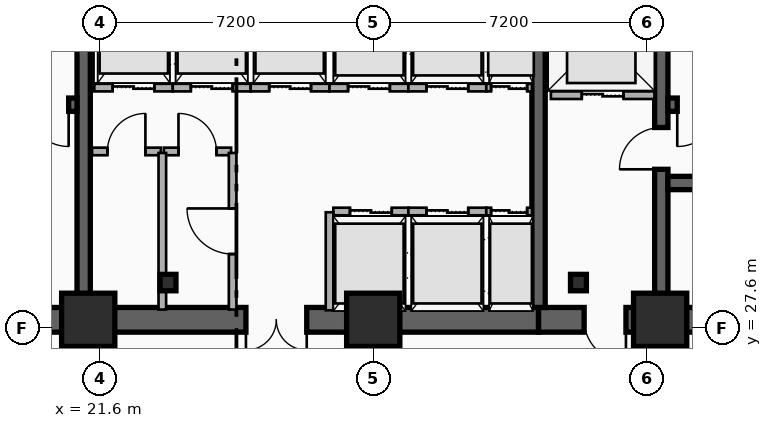
"""IFC4 building model, lengths in metres.
Left out: names, types, materials, properties, quantities, classifications, styles, units other than length and angle.
Written with IfcOpenShell. Run it as: python <this file> out.ifc"""

import sys

from ifc_helpers import new_model, si_unit, direction, frame, frame_2d, origin, origin_2d, place, context, subcontext, project, spatial, rectangle, i_section, extrude, element, fill, save


model = new_model("IFC4")
c1 = context("Model", 3, precision=1e-05, world=origin(), true_north=direction((0.0, 1.0)))
c2 = subcontext(c1, "Body", "Model", "MODEL_VIEW")
j1 = project(units=[si_unit("LENGTHUNIT", "METRE"), si_unit("PLANEANGLEUNIT", "RADIAN")], contexts=[c1])
p1 = place(None, origin())
s1 = spatial("IfcSite", under=j1, at=p1, CompositionType="ELEMENT")
p2 = place(p1, origin())
s2 = spatial("IfcBuilding", under=s1, at=p2, CompositionType="ELEMENT")
p3 = place(p2, frame((0.0, 0.0, 89.8)))
s3 = spatial("IfcBuildingStorey", under=s2, at=p3, CompositionType="ELEMENT", Elevation=89.8)
p4 = place(p3, frame((21.18, 27.82, 0.0), z_axis=(0.0, 0.0, 1.0), x_axis=(-1.0, 0.0, 0.0)))
e1 = element("IfcWall", 1, at=p4, inside=s3, PredefinedType="SHEAR", context=c2, shape_type="SweptSolid", body=[
    extrude(rectangle(XDim=9.03, YDim=0.65, at=frame_2d((4.515, 0.0))), origin(), (0.0, 0.0, 1.0), 4.5),
])
p5 = place(p4, frame((2.68, 0.0, 0.0)))
e2 = element("IfcOpeningElement", 2, at=p5, cuts=e1, PredefinedType="OPENING", context=c2, shape_type="SweptSolid", body=[
    extrude(rectangle(XDim=1.1, YDim=2.15, at=frame_2d((0.55, 1.075))), frame((0.0, 0.335, 0.0), z_axis=(0.0, -1.0, 0.0), x_axis=(1.0, 0.0, 0.0)), (0.0, 0.0, 1.0), 0.67),
])
p6 = place(p3, frame((33.15, 27.82, 0.0), z_axis=(0.0, 0.0, 1.0), x_axis=(-1.0, 0.0, 0.0)))
e3 = element("IfcWall", 3, at=p6, inside=s3, PredefinedType="SHEAR", context=c2, shape_type="SweptSolid", body=[
    extrude(rectangle(XDim=11.97, YDim=0.65, at=frame_2d((5.985, 0.0))), origin(), (0.0, 0.0, 1.0), 4.5),
])
p7 = place(p6, frame((6.1, 0.0, 0.0)))
e4 = element("IfcOpeningElement", 4, at=p7, cuts=e3, PredefinedType="OPENING", context=c2, shape_type="SweptSolid", body=[
    extrude(rectangle(XDim=1.6, YDim=2.2, at=frame_2d((0.8, 1.1))), frame((0.0, 0.335, 0.0), z_axis=(0.0, -1.0, 0.0), x_axis=(1.0, 0.0, 0.0)), (0.0, 0.0, 1.0), 0.67),
])
p8 = place(p3, frame((45.38, 27.82, 0.0), z_axis=(0.0, 0.0, 1.0), x_axis=(-1.0, 0.0, 0.0)))
e5 = element("IfcWall", 5, at=p8, inside=s3, PredefinedType="SHEAR", context=c2, shape_type="SweptSolid", body=[
    extrude(rectangle(XDim=12.23, YDim=0.65, at=frame_2d((6.115, 0.0))), origin(), (0.0, 0.0, 1.0), 4.5),
])
p9 = place(p8, frame((9.93, 0.0, 0.0)))
e6 = element("IfcOpeningElement", 6, at=p9, cuts=e5, PredefinedType="OPENING", context=c2, shape_type="SweptSolid", body=[
    extrude(rectangle(XDim=1.1, YDim=2.15, at=frame_2d((0.55, 1.075))), frame((0.0, 0.335, 0.0), z_axis=(0.0, -1.0, 0.0), x_axis=(1.0, 0.0, 0.0)), (0.0, 0.0, 1.0), 0.67),
])
p10 = place(p8, frame((6.23, 0.0, 0.0)))
e7 = element("IfcOpeningElement", 7, at=p10, cuts=e5, PredefinedType="OPENING", context=c2, shape_type="SweptSolid", body=[
    extrude(rectangle(XDim=1.1, YDim=2.15, at=frame_2d((0.55, 1.075))), frame((0.0, 0.335, 0.0), z_axis=(0.0, -1.0, 0.0), x_axis=(1.0, 0.0, 0.0)), (0.0, 0.0, 1.0), 0.67),
])
for number, where, z_axis, x_axis in (
    (8, (21.18, 28.145, 0.0), (0.0, 0.0, 1.0), (0.0, 1.0, 0.0)),
    (9, (33.15, 28.145, 0.0), (0.0, 0.0, 1.0), (0.0, 1.0, 0.0)),
):
    element("IfcWall", number, at=place(p3, frame(where, z_axis=z_axis, x_axis=x_axis)), inside=s3, PredefinedType="SHEAR", context=c2, shape_type="SweptSolid", body=[
        extrude(rectangle(XDim=8.58, YDim=0.35, at=frame_2d((4.29, 0.0))), origin(), (0.0, 0.0, 1.0), 4.5),
    ])
p11 = place(p3, frame((36.38, 28.145, 0.0), z_axis=(0.0, 0.0, 1.0), x_axis=(0.0, 1.0, 0.0)))
e10 = element("IfcWall", 10, at=p11, inside=s3, PredefinedType="SHEAR", context=c2, shape_type="SweptSolid", body=[
    extrude(rectangle(XDim=8.58, YDim=0.35, at=frame_2d((4.29, 0.0))), origin(), (0.0, 0.0, 1.0), 4.5),
])
p12 = place(p11, frame((3.635, 0.0, 0.0)))
e11 = element("IfcOpeningElement", 11, at=p12, cuts=e10, PredefinedType="OPENING", context=c2, shape_type="SweptSolid", body=[
    extrude(rectangle(XDim=1.1, YDim=2.15, at=frame_2d((0.55, 1.075))), frame((0.0, 0.185, 0.0), z_axis=(0.0, -1.0, 0.0), x_axis=(1.0, 0.0, 0.0)), (0.0, 0.0, 1.0), 0.37),
])
p13 = place(p3, frame((21.005, 33.48, 0.0), z_axis=(0.0, 0.0, 1.0), x_axis=(-1.0, 0.0, 0.0)))
e12 = element("IfcWall", 12, at=p13, inside=s3, PredefinedType="SHEAR", context=c2, shape_type="SweptSolid", body=[
    extrude(rectangle(XDim=8.53, YDim=0.35, at=frame_2d((4.265, 0.0))), origin(), (0.0, 0.0, 1.0), 4.5),
])
p14 = place(p13, frame((0.22, 0.0, 0.0)))
e13 = element("IfcOpeningElement", 13, at=p14, cuts=e12, PredefinedType="OPENING", context=c2, shape_type="SweptSolid", body=[
    extrude(rectangle(XDim=1.1, YDim=2.15, at=frame_2d((0.55, 1.075))), frame((0.0, 0.185, 0.0), z_axis=(0.0, -1.0, 0.0), x_axis=(1.0, 0.0, 0.0)), (0.0, 0.0, 1.0), 0.37),
])
p15 = place(p3, frame((45.055, 33.48, 0.0), z_axis=(0.0, 0.0, 1.0), x_axis=(-1.0, 0.0, 0.0)))
e14 = element("IfcWall", 14, at=p15, inside=s3, PredefinedType="SHEAR", context=c2, shape_type="SweptSolid", body=[
    extrude(rectangle(XDim=8.5, YDim=0.35, at=frame_2d((4.25, 0.0))), origin(), (0.0, 0.0, 1.0), 4.5),
])
p16 = place(p15, frame((7.155, 0.0, 0.0)))
e15 = element("IfcOpeningElement", 15, at=p16, cuts=e14, PredefinedType="OPENING", context=c2, shape_type="SweptSolid", body=[
    extrude(rectangle(XDim=1.1, YDim=2.15, at=frame_2d((0.55, 1.075))), frame((0.0, 0.185, 0.0), z_axis=(0.0, -1.0, 0.0), x_axis=(1.0, 0.0, 0.0)), (0.0, 0.0, 1.0), 0.37),
])
p17 = place(p3, frame((36.555, 31.42, 0.0), z_axis=(0.0, 0.0, 1.0), x_axis=(1.0, 0.0, 0.0)))
e16 = element("IfcWall", 16, at=p17, inside=s3, PredefinedType="SHEAR", context=c2, shape_type="SweptSolid", body=[
    extrude(rectangle(XDim=8.5, YDim=0.35, at=frame_2d((4.25, 0.0))), origin(), (0.0, 0.0, 1.0), 4.5),
])
for number, where, z_axis, x_axis in (
    (17, (23.4, 28.8, 0.0), (0.0, 0.0, 1.0), (1.0, 0.0, 0.0)),
    (18, (34.2, 28.8, 0.0), (0.0, 0.0, 1.0), (1.0, 0.0, 0.0)),
):
    element("IfcColumn", number, at=place(p3, frame(where, z_axis=z_axis, x_axis=x_axis)), inside=s3, PredefinedType="COLUMN", context=c2, shape_type="SweptSolid", body=[
        extrude(i_section(OverallWidth=0.418, OverallDepth=0.432, WebThickness=0.035, FlangeThickness=0.056, FilletRadius=0.015, at=origin_2d()), origin(), (0.0, 0.0, 1.0), 4.5),
    ])
for number, where, z_axis, x_axis in (
    (19, (21.3, 27.82, 0.0), (0.0, 0.0, 1.0), (1.0, 0.0, 0.0)),
    (20, (28.8, 27.82, 0.0), (0.0, 0.0, 1.0), (1.0, 0.0, 0.0)),
    (21, (36.35, 27.82, 0.0), (0.0, 0.0, 1.0), (1.0, 0.0, 0.0)),
):
    element("IfcColumn", number, at=place(p3, frame(where, z_axis=z_axis, x_axis=x_axis)), inside=s3, PredefinedType="COLUMN", context=c2, shape_type="SweptSolid", body=[
        extrude(rectangle(XDim=1.4, YDim=1.4, at=origin_2d()), origin(), (0.0, 0.0, 1.0), 4.5),
    ])
p18 = place(p3, frame((33.475, 33.73, 0.0), z_axis=(0.0, 0.0, 1.0), x_axis=(1.0, 0.0, 0.0)))
e22 = element("IfcWall", 22, at=p18, inside=s3, PredefinedType="PARTITIONING", context=c2, shape_type="SweptSolid", body=[
    extrude(rectangle(XDim=2.725, YDim=0.2, at=frame_2d((1.362, 0.0))), origin(), (0.0, 0.0, 1.0), 3.212),
])
p19 = place(p18, frame((0.812, 0.0, 0.0)))
e23 = element("IfcOpeningElement", 23, at=p19, cuts=e22, PredefinedType="OPENING", context=c2, shape_type="SweptSolid", body=[
    extrude(rectangle(XDim=1.1, YDim=2.15, at=frame_2d((0.55, 1.075))), frame((0.0, 0.11, 0.0), z_axis=(0.0, -1.0, 0.0), x_axis=(1.0, 0.0, 0.0)), (0.0, 0.0, 1.0), 0.22),
])
p20 = place(p3, frame((27.75, 30.67, 0.0), z_axis=(0.0, 0.0, 1.0), x_axis=(1.0, 0.0, 0.0)))
e24 = element("IfcWall", 24, at=p20, inside=s3, PredefinedType="PARTITIONING", context=c2, shape_type="SweptSolid", body=[
    extrude(rectangle(XDim=1.975, YDim=0.2, at=frame_2d((0.988, 0.0))), origin(), (0.0, 0.0, 1.0), 3.212),
])
p21 = place(p20, frame((0.438, 0.0, 0.0)))
e25 = element("IfcOpeningElement", 25, at=p21, cuts=e24, PredefinedType="OPENING", context=c2, shape_type="SweptSolid", body=[
    extrude(rectangle(XDim=1.1, YDim=2.15, at=frame_2d((0.55, 1.075))), frame((0.0, 0.11, 0.0), z_axis=(0.0, -1.0, 0.0), x_axis=(1.0, 0.0, 0.0)), (0.0, 0.0, 1.0), 0.22),
])
p22 = place(p3, frame((27.65, 28.07, 0.0), z_axis=(0.0, 0.0, 1.0), x_axis=(0.0, 1.0, 0.0)))
e26 = element("IfcWall", 26, at=p22, inside=s3, PredefinedType="PARTITIONING", context=c2, shape_type="SweptSolid", body=[
    extrude(rectangle(XDim=2.58, YDim=0.2, at=frame_2d((1.29, 0.0))), origin(), (0.0, 0.0, 1.0), 3.212),
])
p23 = place(p3, frame((29.725, 30.67, 0.0), z_axis=(0.0, 0.0, 1.0), x_axis=(1.0, 0.0, 0.0)))
e27 = element("IfcWall", 27, at=p23, inside=s3, PredefinedType="PARTITIONING", context=c2, shape_type="SweptSolid", body=[
    extrude(rectangle(XDim=2.05, YDim=0.2, at=frame_2d((1.025, 0.0))), origin(), (0.0, 0.0, 1.0), 3.62),
])
p24 = place(p23, frame((0.475, 0.0, 0.0)))
e28 = element("IfcOpeningElement", 28, at=p24, cuts=e27, PredefinedType="OPENING", context=c2, shape_type="SweptSolid", body=[
    extrude(rectangle(XDim=1.1, YDim=2.15, at=frame_2d((0.55, 1.075))), frame((0.0, 0.11, 0.0), z_axis=(0.0, -1.0, 0.0), x_axis=(1.0, 0.0, 0.0)), (0.0, 0.0, 1.0), 0.22),
])
p25 = place(p3, frame((31.775, 30.67, 0.0), z_axis=(0.0, 0.0, 1.0), x_axis=(1.0, 0.0, 0.0)))
e29 = element("IfcWall", 29, at=p25, inside=s3, PredefinedType="PARTITIONING", context=c2, shape_type="SweptSolid", body=[
    extrude(rectangle(XDim=1.2, YDim=0.2, at=frame_2d((0.6, 0.0))), origin(), (0.0, 0.0, 1.0), 3.62),
])
p26 = place(p25, frame((0.125, 0.0, 0.0)))
e30 = element("IfcOpeningElement", 30, at=p26, cuts=e29, PredefinedType="OPENING", context=c2, shape_type="SweptSolid", body=[
    extrude(rectangle(XDim=0.95, YDim=2.15, at=frame_2d((0.475, 1.075))), frame((0.0, 0.11, 0.0), z_axis=(0.0, -1.0, 0.0), x_axis=(1.0, 0.0, 0.0)), (0.0, 0.0, 1.0), 0.22),
])
p27 = place(p3, frame((21.46, 33.93, 0.0), z_axis=(0.0, 0.0, 1.0), x_axis=(1.0, 0.0, 0.0)))
e31 = element("IfcWall", 31, at=p27, inside=s3, PredefinedType="PARTITIONING", context=c2, shape_type="SweptSolid", body=[
    extrude(rectangle(XDim=2.065, YDim=0.2, at=frame_2d((1.032, 0.0))), origin(), (0.0, 0.0, 1.0), 3.212),
])
p28 = place(p27, frame((0.482, 0.0, 0.0)))
e32 = element("IfcOpeningElement", 32, at=p28, cuts=e31, PredefinedType="OPENING", context=c2, shape_type="SweptSolid", body=[
    extrude(rectangle(XDim=1.1, YDim=2.15, at=frame_2d((0.55, 1.075))), frame((0.0, 0.11, 0.0), z_axis=(0.0, -1.0, 0.0), x_axis=(1.0, 0.0, 0.0)), (0.0, 0.0, 1.0), 0.22),
])
p29 = place(p3, frame((23.525, 33.93, 0.0), z_axis=(0.0, 0.0, 1.0), x_axis=(1.0, 0.0, 0.0)))
e33 = element("IfcWall", 33, at=p29, inside=s3, PredefinedType="PARTITIONING", context=c2, shape_type="SweptSolid", body=[
    extrude(rectangle(XDim=2.05, YDim=0.2, at=frame_2d((1.025, 0.0))), origin(), (0.0, 0.0, 1.0), 4.24),
])
p30 = place(p29, frame((0.475, 0.0, 0.0)))
e34 = element("IfcOpeningElement", 34, at=p30, cuts=e33, PredefinedType="OPENING", context=c2, shape_type="SweptSolid", body=[
    extrude(rectangle(XDim=1.1, YDim=2.15, at=frame_2d((0.55, 1.075))), frame((0.0, 0.11, 0.0), z_axis=(0.0, -1.0, 0.0), x_axis=(1.0, 0.0, 0.0)), (0.0, 0.0, 1.0), 0.22),
])
p31 = place(p3, frame((25.575, 33.93, 0.0), z_axis=(0.0, 0.0, 1.0), x_axis=(1.0, 0.0, 0.0)))
e35 = element("IfcWall", 35, at=p31, inside=s3, PredefinedType="PARTITIONING", context=c2, shape_type="SweptSolid", body=[
    extrude(rectangle(XDim=2.075, YDim=0.2, at=frame_2d((1.038, 0.0))), origin(), (0.0, 0.0, 1.0), 4.24),
])
p32 = place(p31, frame((0.488, 0.0, 0.0)))
e36 = element("IfcOpeningElement", 36, at=p32, cuts=e35, PredefinedType="OPENING", context=c2, shape_type="SweptSolid", body=[
    extrude(rectangle(XDim=1.1, YDim=2.15, at=frame_2d((0.55, 1.075))), frame((0.0, 0.11, 0.0), z_axis=(0.0, -1.0, 0.0), x_axis=(1.0, 0.0, 0.0)), (0.0, 0.0, 1.0), 0.22),
])
p33 = place(p3, frame((27.65, 33.93, 0.0), z_axis=(0.0, 0.0, 1.0), x_axis=(1.0, 0.0, 0.0)))
e37 = element("IfcWall", 37, at=p33, inside=s3, PredefinedType="PARTITIONING", context=c2, shape_type="SweptSolid", body=[
    extrude(rectangle(XDim=2.075, YDim=0.2, at=frame_2d((1.038, 0.0))), origin(), (0.0, 0.0, 1.0), 3.212),
])
p34 = place(p33, frame((0.488, 0.0, 0.0)))
e38 = element("IfcOpeningElement", 38, at=p34, cuts=e37, PredefinedType="OPENING", context=c2, shape_type="SweptSolid", body=[
    extrude(rectangle(XDim=1.1, YDim=2.15, at=frame_2d((0.55, 1.075))), frame((0.0, 0.11, 0.0), z_axis=(0.0, -1.0, 0.0), x_axis=(1.0, 0.0, 0.0)), (0.0, 0.0, 1.0), 0.22),
])
p35 = place(p3, frame((29.725, 33.93, 0.0), z_axis=(0.0, 0.0, 1.0), x_axis=(1.0, 0.0, 0.0)))
e39 = element("IfcWall", 39, at=p35, inside=s3, PredefinedType="PARTITIONING", context=c2, shape_type="SweptSolid", body=[
    extrude(rectangle(XDim=2.05, YDim=0.2, at=frame_2d((1.025, 0.0))), origin(), (0.0, 0.0, 1.0), 4.24),
])
p36 = place(p35, frame((0.475, 0.0, 0.0)))
e40 = element("IfcOpeningElement", 40, at=p36, cuts=e39, PredefinedType="OPENING", context=c2, shape_type="SweptSolid", body=[
    extrude(rectangle(XDim=1.1, YDim=2.15, at=frame_2d((0.55, 1.075))), frame((0.0, 0.11, 0.0), z_axis=(0.0, -1.0, 0.0), x_axis=(1.0, 0.0, 0.0)), (0.0, 0.0, 1.0), 0.22),
])
p37 = place(p3, frame((31.775, 33.93, 0.0), z_axis=(0.0, 0.0, 1.0), x_axis=(1.0, 0.0, 0.0)))
e41 = element("IfcWall", 41, at=p37, inside=s3, PredefinedType="PARTITIONING", context=c2, shape_type="SweptSolid", body=[
    extrude(rectangle(XDim=1.2, YDim=0.2, at=frame_2d((0.6, 0.0))), origin(), (0.0, 0.0, 1.0), 4.24),
])
p38 = place(p37, frame((0.125, 0.0, 0.0)))
e42 = element("IfcOpeningElement", 42, at=p38, cuts=e41, PredefinedType="OPENING", context=c2, shape_type="SweptSolid", body=[
    extrude(rectangle(XDim=0.95, YDim=2.15, at=frame_2d((0.475, 1.075))), frame((0.0, 0.11, 0.0), z_axis=(0.0, -1.0, 0.0), x_axis=(1.0, 0.0, 0.0)), (0.0, 0.0, 1.0), 0.22),
])
p39 = place(p3, frame((21.4, 32.25, 0.0), z_axis=(0.0, 0.0, 1.0), x_axis=(1.0, 0.0, 0.0)))
e43 = element("IfcWall", 43, at=p39, inside=s3, PredefinedType="PARTITIONING", context=c2, shape_type="SweptSolid", body=[
    extrude(rectangle(XDim=1.81, YDim=0.2, at=frame_2d((0.905, 0.0))), origin(), (0.0, 0.0, 1.0), 3.212),
])
p40 = place(p39, frame((0.405, 0.0, 0.0)))
e44 = element("IfcOpeningElement", 44, at=p40, cuts=e43, PredefinedType="OPENING", context=c2, shape_type="SweptSolid", body=[
    extrude(rectangle(XDim=1.0, YDim=2.15, at=frame_2d((0.5, 1.075))), frame((0.0, 0.11, 0.0), z_axis=(0.0, -1.0, 0.0), x_axis=(1.0, 0.0, 0.0)), (0.0, 0.0, 1.0), 0.22),
])
p41 = place(p3, frame((23.29, 32.25, 0.0), z_axis=(0.0, 0.0, 1.0), x_axis=(1.0, 0.0, 0.0)))
e45 = element("IfcWall", 45, at=p41, inside=s3, PredefinedType="PARTITIONING", context=c2, shape_type="SweptSolid", body=[
    extrude(rectangle(XDim=1.77, YDim=0.2, at=frame_2d((0.885, 0.0))), origin(), (0.0, 0.0, 1.0), 4.24),
])
p42 = place(p41, frame((0.385, 0.0, 0.0)))
e46 = element("IfcOpeningElement", 46, at=p42, cuts=e45, PredefinedType="OPENING", context=c2, shape_type="SweptSolid", body=[
    extrude(rectangle(XDim=1.0, YDim=2.15, at=frame_2d((0.5, 1.075))), frame((0.0, 0.11, 0.0), z_axis=(0.0, -1.0, 0.0), x_axis=(1.0, 0.0, 0.0)), (0.0, 0.0, 1.0), 0.22),
])
p43 = place(p3, frame((25.1, 28.09, 0.0), z_axis=(0.0, 0.0, 1.0), x_axis=(0.0, 1.0, 0.0)))
e47 = element("IfcWall", 47, at=p43, inside=s3, PredefinedType="PARTITIONING", context=c2, shape_type="SweptSolid", body=[
    extrude(rectangle(XDim=4.12, YDim=0.2, at=frame_2d((2.06, 0.0))), origin(), (0.0, 0.0, 1.0), 3.62),
])
p44 = place(p43, frame((1.46, 0.0, 0.0)))
e48 = element("IfcOpeningElement", 48, at=p44, cuts=e47, PredefinedType="OPENING", context=c2, shape_type="SweptSolid", body=[
    extrude(rectangle(XDim=1.2, YDim=2.15, at=frame_2d((0.6, 1.075))), frame((0.0, 0.11, 0.0), z_axis=(0.0, -1.0, 0.0), x_axis=(1.0, 0.0, 0.0)), (0.0, 0.0, 1.0), 0.22),
])
p45 = place(p3, frame((23.25, 28.09, 0.0), z_axis=(0.0, 0.0, 1.0), x_axis=(0.0, 1.0, 0.0)))
e49 = element("IfcWall", 49, at=p45, inside=s3, PredefinedType="PARTITIONING", context=c2, shape_type="SweptSolid", body=[
    extrude(rectangle(XDim=4.12, YDim=0.2, at=frame_2d((2.06, 0.0))), origin(), (0.0, 0.0, 1.0), 3.62),
])
p46 = place(p19, origin())
e50 = element("IfcDoor", 50, at=p46, inside=s3, OperationType="DOUBLE_DOOR_SLIDING", PredefinedType="DOOR", context=c2, shape_type="SweptSolid", body=[
    extrude(rectangle(XDim=1.1, YDim=2.15, at=frame_2d((0.55, 1.075))), frame((0.0, 0.025, 0.0), z_axis=(0.0, -1.0, 0.0), x_axis=(1.0, 0.0, 0.0)), (0.0, 0.0, 1.0), 0.05),
])
fill(e23, e50)
p47 = place(p21, origin())
e51 = element("IfcDoor", 51, at=p47, inside=s3, OperationType="DOUBLE_DOOR_SLIDING", PredefinedType="DOOR", context=c2, shape_type="SweptSolid", body=[
    extrude(rectangle(XDim=1.1, YDim=2.15, at=frame_2d((0.55, 1.075))), frame((0.0, 0.025, 0.0), z_axis=(0.0, -1.0, 0.0), x_axis=(1.0, 0.0, 0.0)), (0.0, 0.0, 1.0), 0.05),
])
fill(e25, e51)
p48 = place(p24, origin())
e52 = element("IfcDoor", 52, at=p48, inside=s3, OperationType="DOUBLE_DOOR_SLIDING", PredefinedType="DOOR", context=c2, shape_type="SweptSolid", body=[
    extrude(rectangle(XDim=1.1, YDim=2.15, at=frame_2d((0.55, 1.075))), frame((0.0, 0.025, 0.0), z_axis=(0.0, -1.0, 0.0), x_axis=(1.0, 0.0, 0.0)), (0.0, 0.0, 1.0), 0.05),
])
fill(e28, e52)
p49 = place(p26, origin())
e53 = element("IfcDoor", 53, at=p49, inside=s3, OperationType="DOUBLE_DOOR_SLIDING", PredefinedType="DOOR", context=c2, shape_type="SweptSolid", body=[
    extrude(rectangle(XDim=0.95, YDim=2.15, at=frame_2d((0.475, 1.075))), frame((0.0, 0.025, 0.0), z_axis=(0.0, -1.0, 0.0), x_axis=(1.0, 0.0, 0.0)), (0.0, 0.0, 1.0), 0.05),
])
fill(e30, e53)
p50 = place(p28, origin())
e54 = element("IfcDoor", 54, at=p50, inside=s3, OperationType="DOUBLE_DOOR_SLIDING", PredefinedType="DOOR", context=c2, shape_type="SweptSolid", body=[
    extrude(rectangle(XDim=1.1, YDim=2.15, at=frame_2d((0.55, 1.075))), frame((0.0, 0.025, 0.0), z_axis=(0.0, -1.0, 0.0), x_axis=(1.0, 0.0, 0.0)), (0.0, 0.0, 1.0), 0.05),
])
fill(e32, e54)
p51 = place(p30, origin())
e55 = element("IfcDoor", 55, at=p51, inside=s3, OperationType="DOUBLE_DOOR_SLIDING", PredefinedType="DOOR", context=c2, shape_type="SweptSolid", body=[
    extrude(rectangle(XDim=1.1, YDim=2.15, at=frame_2d((0.55, 1.075))), frame((0.0, 0.025, 0.0), z_axis=(0.0, -1.0, 0.0), x_axis=(1.0, 0.0, 0.0)), (0.0, 0.0, 1.0), 0.05),
])
fill(e34, e55)
p52 = place(p32, origin())
e56 = element("IfcDoor", 56, at=p52, inside=s3, OperationType="DOUBLE_DOOR_SLIDING", PredefinedType="DOOR", context=c2, shape_type="SweptSolid", body=[
    extrude(rectangle(XDim=1.1, YDim=2.15, at=frame_2d((0.55, 1.075))), frame((0.0, 0.025, 0.0), z_axis=(0.0, -1.0, 0.0), x_axis=(1.0, 0.0, 0.0)), (0.0, 0.0, 1.0), 0.05),
])
fill(e36, e56)
p53 = place(p34, origin())
e57 = element("IfcDoor", 57, at=p53, inside=s3, OperationType="DOUBLE_DOOR_SLIDING", PredefinedType="DOOR", context=c2, shape_type="SweptSolid", body=[
    extrude(rectangle(XDim=1.1, YDim=2.15, at=frame_2d((0.55, 1.075))), frame((0.0, 0.025, 0.0), z_axis=(0.0, -1.0, 0.0), x_axis=(1.0, 0.0, 0.0)), (0.0, 0.0, 1.0), 0.05),
])
fill(e38, e57)
p54 = place(p36, origin())
e58 = element("IfcDoor", 58, at=p54, inside=s3, OperationType="DOUBLE_DOOR_SLIDING", PredefinedType="DOOR", context=c2, shape_type="SweptSolid", body=[
    extrude(rectangle(XDim=1.1, YDim=2.15, at=frame_2d((0.55, 1.075))), frame((0.0, 0.025, 0.0), z_axis=(0.0, -1.0, 0.0), x_axis=(1.0, 0.0, 0.0)), (0.0, 0.0, 1.0), 0.05),
])
fill(e40, e58)
p55 = place(p38, origin())
e59 = element("IfcDoor", 59, at=p55, inside=s3, OperationType="DOUBLE_DOOR_SLIDING", PredefinedType="DOOR", context=c2, shape_type="SweptSolid", body=[
    extrude(rectangle(XDim=0.95, YDim=2.15, at=frame_2d((0.475, 1.075))), frame((0.0, 0.025, 0.0), z_axis=(0.0, -1.0, 0.0), x_axis=(1.0, 0.0, 0.0)), (0.0, 0.0, 1.0), 0.05),
])
fill(e42, e59)
p56 = place(p14, origin())
e60 = element("IfcDoor", 60, at=p56, inside=s3, OperationType="SINGLE_SWING_LEFT", PredefinedType="DOOR", context=c2, shape_type="SweptSolid", body=[
    extrude(rectangle(XDim=1.1, YDim=2.15, at=frame_2d((0.55, 1.075))), frame((0.0, 0.025, 0.0), z_axis=(0.0, -1.0, 0.0), x_axis=(1.0, 0.0, 0.0)), (0.0, 0.0, 1.0), 0.05),
])
fill(e13, e60)
p57 = place(p16, origin())
e61 = element("IfcDoor", 61, at=p57, inside=s3, OperationType="SINGLE_SWING_RIGHT", PredefinedType="DOOR", context=c2, shape_type="SweptSolid", body=[
    extrude(rectangle(XDim=1.1, YDim=2.15, at=frame_2d((0.55, 1.075))), frame((0.0, 0.025, 0.0), z_axis=(0.0, -1.0, 0.0), x_axis=(1.0, 0.0, 0.0)), (0.0, 0.0, 1.0), 0.05),
])
fill(e15, e61)
p58 = place(p12, origin())
e62 = element("IfcDoor", 62, at=p58, inside=s3, OperationType="SINGLE_SWING_LEFT", PredefinedType="DOOR", context=c2, shape_type="SweptSolid", body=[
    extrude(rectangle(XDim=1.1, YDim=2.15, at=frame_2d((0.55, 1.075))), frame((0.0, 0.025, 0.0), z_axis=(0.0, -1.0, 0.0), x_axis=(1.0, 0.0, 0.0)), (0.0, 0.0, 1.0), 0.05),
])
fill(e11, e62)
p59 = place(p9, origin())
e63 = element("IfcDoor", 63, at=p59, inside=s3, OperationType="SINGLE_SWING_LEFT", PredefinedType="DOOR", context=c2, shape_type="SweptSolid", body=[
    extrude(rectangle(XDim=1.1, YDim=2.15, at=frame_2d((0.55, 1.075))), frame((0.0, 0.025, 0.0), z_axis=(0.0, -1.0, 0.0), x_axis=(1.0, 0.0, 0.0)), (0.0, 0.0, 1.0), 0.05),
])
fill(e6, e63)
p60 = place(p7, origin())
e64 = element("IfcDoor", 64, at=p60, inside=s3, OperationType="SINGLE_SWING_LEFT", PredefinedType="DOOR", context=c2, shape_type="SweptSolid", body=[
    extrude(rectangle(XDim=1.6, YDim=2.2, at=frame_2d((0.8, 1.1))), frame((0.0, 0.025, 0.0), z_axis=(0.0, -1.0, 0.0), x_axis=(1.0, 0.0, 0.0)), (0.0, 0.0, 1.0), 0.05),
])
fill(e4, e64)
p61 = place(p40, origin())
e65 = element("IfcDoor", 65, at=p61, inside=s3, OperationType="SINGLE_SWING_RIGHT", PredefinedType="DOOR", context=c2, shape_type="SweptSolid", body=[
    extrude(rectangle(XDim=1.0, YDim=2.15, at=frame_2d((0.5, 1.075))), frame((0.0, 0.025, 0.0), z_axis=(0.0, -1.0, 0.0), x_axis=(1.0, 0.0, 0.0)), (0.0, 0.0, 1.0), 0.05),
])
fill(e44, e65)
p62 = place(p42, origin())
e66 = element("IfcDoor", 66, at=p62, inside=s3, OperationType="SINGLE_SWING_LEFT", PredefinedType="DOOR", context=c2, shape_type="SweptSolid", body=[
    extrude(rectangle(XDim=1.0, YDim=2.15, at=frame_2d((0.5, 1.075))), frame((0.0, 0.025, 0.0), z_axis=(0.0, -1.0, 0.0), x_axis=(1.0, 0.0, 0.0)), (0.0, 0.0, 1.0), 0.05),
])
fill(e46, e66)
p63 = place(p44, origin())
e67 = element("IfcDoor", 67, at=p63, inside=s3, OperationType="SINGLE_SWING_RIGHT", PredefinedType="DOOR", context=c2, shape_type="SweptSolid", body=[
    extrude(rectangle(XDim=1.2, YDim=2.15, at=frame_2d((0.6, 1.075))), frame((0.0, 0.025, 0.0), z_axis=(0.0, -1.0, 0.0), x_axis=(1.0, 0.0, 0.0)), (0.0, 0.0, 1.0), 0.05),
])
fill(e48, e67)
save(model, sys.argv[1])
